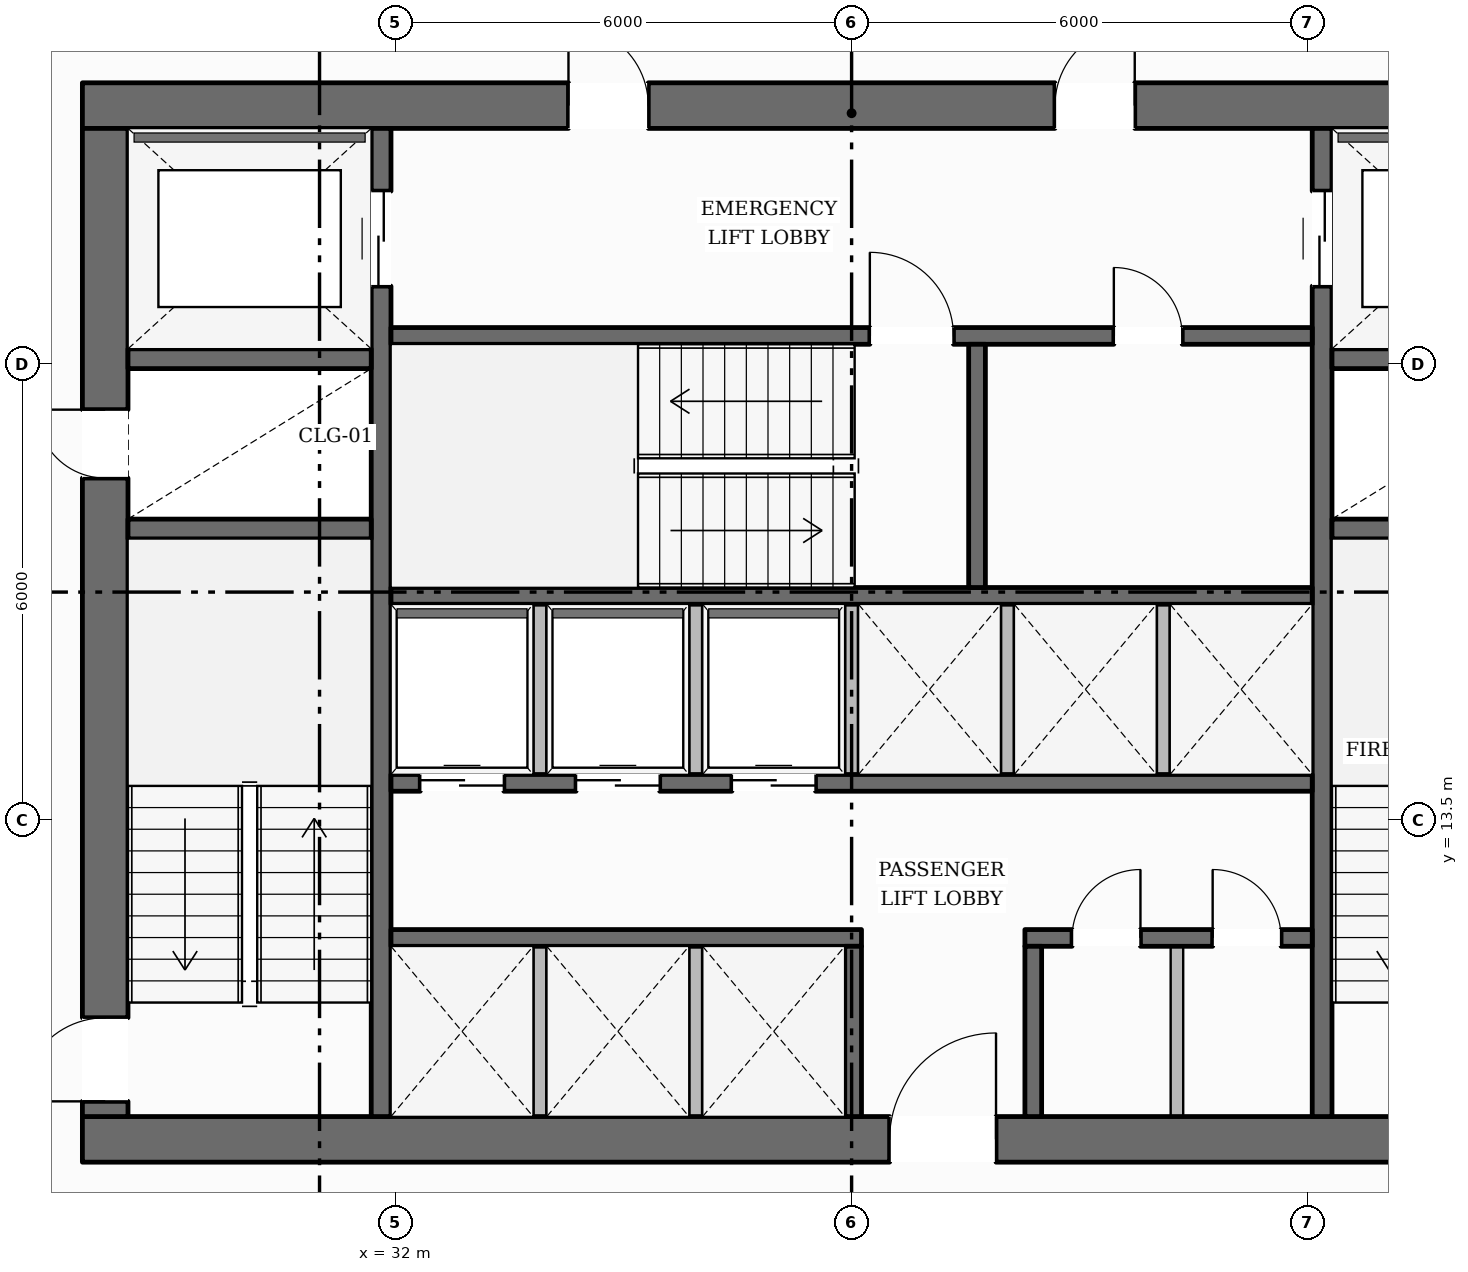
"""IFC4 building model, lengths in metres.
Left out: names, types, materials, properties, quantities, classifications, styles, units other than length and angle.
Written with IfcOpenShell. Run it as: python <this file> out.ifc"""

import sys

from ifc_helpers import new_model, si_unit, direction, frame, frame_2d, origin, place, context, subcontext, project, spatial, rectangle, extrude, element, fill, save


model = new_model("IFC4")
c1 = context("Model", 3, precision=1e-05, world=origin(), true_north=direction((0.0, 1.0)))
c2 = subcontext(c1, "Body", "Model", "MODEL_VIEW")
j1 = project(units=[si_unit("LENGTHUNIT", "METRE"), si_unit("PLANEANGLEUNIT", "RADIAN")], contexts=[c1])
p1 = place(None, origin())
s1 = spatial("IfcSite", under=j1, at=p1, CompositionType="ELEMENT")
p2 = place(p1, origin())
s2 = spatial("IfcBuilding", under=s1, at=p2, CompositionType="ELEMENT")
p3 = place(p2, frame((0.0, 0.0, 21.4)))
s3 = spatial("IfcBuildingStorey", under=s2, at=p3, CompositionType="ELEMENT", Elevation=21.4)
p4 = place(p3, frame((27.88, 9.3, 0.0), z_axis=(0.0, 0.0, 1.0), x_axis=(1.0, 0.0, 0.0)))
e1 = element("IfcWall", 1, at=p4, inside=s3, PredefinedType="SOLIDWALL", context=c2, shape_type="SweptSolid", body=[
    extrude(rectangle(XDim=20.24, YDim=0.6, at=frame_2d((10.12, 0.0))), origin(), (0.0, 0.0, 1.0), 3.59),
])
p5 = place(p4, frame((10.62, 0.0, 0.0)))
e2 = element("IfcOpeningElement", 2, at=p5, cuts=e1, PredefinedType="OPENING", context=c2, shape_type="SweptSolid", body=[
    extrude(rectangle(XDim=1.4, YDim=2.2, at=frame_2d((0.7, 1.1))), frame((0.0, 0.31, 0.0), z_axis=(0.0, -1.0, 0.0), x_axis=(1.0, 0.0, 0.0)), (0.0, 0.0, 1.0), 0.62),
])
p6 = place(p3, frame((27.88, 22.9, 0.0), z_axis=(0.0, 0.0, 1.0), x_axis=(1.0, 0.0, 0.0)))
e3 = element("IfcWall", 3, at=p6, inside=s3, PredefinedType="SOLIDWALL", context=c2, shape_type="SweptSolid", body=[
    extrude(rectangle(XDim=20.24, YDim=0.6, at=frame_2d((10.12, 0.0))), origin(), (0.0, 0.0, 1.0), 3.59),
])
p7 = place(p6, frame((6.395, 0.0, 0.0)))
e4 = element("IfcOpeningElement", 4, at=p7, cuts=e3, PredefinedType="OPENING", context=c2, shape_type="SweptSolid", body=[
    extrude(rectangle(XDim=1.05, YDim=2.15, at=frame_2d((0.525, 1.075))), frame((0.0, 0.31, 0.0), z_axis=(0.0, -1.0, 0.0), x_axis=(1.0, 0.0, 0.0)), (0.0, 0.0, 1.0), 0.62),
])
p8 = place(p6, frame((12.795, 0.0, 0.0)))
e5 = element("IfcOpeningElement", 5, at=p8, cuts=e3, PredefinedType="OPENING", context=c2, shape_type="SweptSolid", body=[
    extrude(rectangle(XDim=1.05, YDim=2.15, at=frame_2d((0.525, 1.075))), frame((0.0, 0.31, 0.0), z_axis=(0.0, -1.0, 0.0), x_axis=(1.0, 0.0, 0.0)), (0.0, 0.0, 1.0), 0.62),
])
p9 = place(p3, frame((28.18, 9.6, 0.0), z_axis=(0.0, 0.0, 1.0), x_axis=(0.0, 1.0, 0.0)))
e6 = element("IfcWall", 6, at=p9, inside=s3, PredefinedType="SOLIDWALL", context=c2, shape_type="SweptSolid", body=[
    extrude(rectangle(XDim=13.0, YDim=0.6, at=frame_2d((6.5, 0.0))), origin(), (0.0, 0.0, 1.0), 3.59),
])
p10 = place(p9, frame((0.2, 0.0, 0.0)))
e7 = element("IfcOpeningElement", 7, at=p10, cuts=e6, PredefinedType="OPENING", context=c2, shape_type="SweptSolid", body=[
    extrude(rectangle(XDim=1.1, YDim=2.15, at=frame_2d((0.55, 1.075))), frame((0.0, 0.31, 0.0), z_axis=(0.0, -1.0, 0.0), x_axis=(1.0, 0.0, 0.0)), (0.0, 0.0, 1.0), 0.62),
])
p11 = place(p9, frame((8.4, 0.0, 0.0)))
e8 = element("IfcOpeningElement", 8, at=p11, cuts=e6, PredefinedType="OPENING", context=c2, shape_type="SweptSolid", body=[
    extrude(rectangle(XDim=0.9, YDim=2.1, at=frame_2d((0.45, 1.05))), frame((0.0, 0.31, 0.0), z_axis=(0.0, -1.0, 0.0), x_axis=(1.0, 0.0, 0.0)), (0.0, 0.0, 1.0), 0.62),
])
p12 = place(p3, frame((31.81, 9.6, 0.0), z_axis=(0.0, 0.0, 1.0), x_axis=(0.0, 1.0, 0.0)))
e9 = element("IfcWall", 9, at=p12, inside=s3, PredefinedType="SHEAR", context=c2, shape_type="SweptSolid", body=[
    extrude(rectangle(XDim=13.0, YDim=0.26, at=frame_2d((6.5, 0.0))), origin(), (0.0, 0.0, 1.0), 3.59),
])
p13 = place(p12, frame((10.925, 0.0, 0.0)))
e10 = element("IfcOpeningElement", 10, at=p13, cuts=e9, PredefinedType="OPENING", context=c2, shape_type="SweptSolid", body=[
    extrude(rectangle(XDim=1.25, YDim=2.25, at=frame_2d((0.625, 1.125))), frame((0.0, 0.14, 0.0), z_axis=(0.0, -1.0, 0.0), x_axis=(1.0, 0.0, 0.0)), (0.0, 0.0, 1.0), 0.28),
])
p14 = place(p3, frame((44.19, 9.6, 0.0), z_axis=(0.0, 0.0, 1.0), x_axis=(0.0, 1.0, 0.0)))
e11 = element("IfcWall", 11, at=p14, inside=s3, PredefinedType="SHEAR", context=c2, shape_type="SweptSolid", body=[
    extrude(rectangle(XDim=13.0, YDim=0.26, at=frame_2d((6.5, 0.0))), origin(), (0.0, 0.0, 1.0), 3.59),
])
p15 = place(p14, frame((10.925, 0.0, 0.0)))
e12 = element("IfcOpeningElement", 12, at=p15, cuts=e11, PredefinedType="OPENING", context=c2, shape_type="SweptSolid", body=[
    extrude(rectangle(XDim=1.25, YDim=2.25, at=frame_2d((0.625, 1.125))), frame((0.0, 0.14, 0.0), z_axis=(0.0, -1.0, 0.0), x_axis=(1.0, 0.0, 0.0)), (0.0, 0.0, 1.0), 0.28),
])
for number, where, z_axis, x_axis in (
    (13, (28.48, 17.33, 0.0), (0.0, 0.0, 1.0), (1.0, 0.0, 0.0)),
    (14, (28.48, 19.57, 0.0), (0.0, 0.0, 1.0), (1.0, 0.0, 0.0)),
    (15, (44.32, 17.33, 0.0), (0.0, 0.0, 1.0), (1.0, 0.0, 0.0)),
    (16, (44.32, 19.57, 0.0), (0.0, 0.0, 1.0), (1.0, 0.0, 0.0)),
):
    element("IfcWall", number, at=place(p3, frame(where, z_axis=z_axis, x_axis=x_axis)), inside=s3, PredefinedType="SHEAR", context=c2, shape_type="SweptSolid", body=[
        extrude(rectangle(XDim=3.2, YDim=0.26, at=frame_2d((1.6, 0.0))), origin(), (0.0, 0.0, 1.0), 3.59),
    ])
p16 = place(p3, frame((31.94, 19.87, 0.0), z_axis=(0.0, 0.0, 1.0), x_axis=(1.0, 0.0, 0.0)))
e17 = element("IfcWall", 17, at=p16, inside=s3, PredefinedType="SOLIDWALL", context=c2, shape_type="SweptSolid", body=[
    extrude(rectangle(XDim=12.12, YDim=0.22, at=frame_2d((6.06, 0.0))), origin(), (0.0, 0.0, 1.0), 3.59),
])
p17 = place(p16, frame((6.3, 0.0, 0.0)))
e18 = element("IfcOpeningElement", 18, at=p17, cuts=e17, PredefinedType="OPENING", context=c2, shape_type="SweptSolid", body=[
    extrude(rectangle(XDim=1.1, YDim=2.15, at=frame_2d((0.55, 1.075))), frame((0.0, 0.12, 0.0), z_axis=(0.0, -1.0, 0.0), x_axis=(1.0, 0.0, 0.0)), (0.0, 0.0, 1.0), 0.24),
])
p18 = place(p16, frame((9.51, 0.0, 0.0)))
e19 = element("IfcOpeningElement", 19, at=p18, cuts=e17, PredefinedType="OPENING", context=c2, shape_type="SweptSolid", body=[
    extrude(rectangle(XDim=0.9, YDim=2.1, at=frame_2d((0.45, 1.05))), frame((0.0, 0.12, 0.0), z_axis=(0.0, -1.0, 0.0), x_axis=(1.0, 0.0, 0.0)), (0.0, 0.0, 1.0), 0.24),
])
p19 = place(p3, frame((31.94, 16.45, 0.0), z_axis=(0.0, 0.0, 1.0), x_axis=(1.0, 0.0, 0.0)))
e20 = element("IfcWall", 20, at=p19, inside=s3, PredefinedType="SOLIDWALL", context=c2, shape_type="SweptSolid", body=[
    extrude(rectangle(XDim=12.12, YDim=0.22, at=frame_2d((6.06, 0.0))), origin(), (0.0, 0.0, 1.0), 3.59),
])
p20 = place(p3, frame((39.65, 16.56, 0.0), z_axis=(0.0, 0.0, 1.0), x_axis=(0.0, 1.0, 0.0)))
e21 = element("IfcWall", 21, at=p20, inside=s3, PredefinedType="SOLIDWALL", context=c2, shape_type="SweptSolid", body=[
    extrude(rectangle(XDim=3.2, YDim=0.22, at=frame_2d((1.6, 0.0))), origin(), (0.0, 0.0, 1.0), 3.59),
])
p21 = place(p3, frame((31.94, 13.99, 0.0), z_axis=(0.0, 0.0, 1.0), x_axis=(1.0, 0.0, 0.0)))
e22 = element("IfcWall", 22, at=p21, inside=s3, PredefinedType="SOLIDWALL", context=c2, shape_type="SweptSolid", body=[
    extrude(rectangle(XDim=12.12, YDim=0.22, at=frame_2d((6.06, 0.0))), origin(), (0.0, 0.0, 1.0), 3.59),
])
p22 = place(p21, frame((0.385, 0.0, 0.0)))
e23 = element("IfcOpeningElement", 23, at=p22, cuts=e22, PredefinedType="OPENING", context=c2, shape_type="SweptSolid", body=[
    extrude(rectangle(XDim=1.1, YDim=2.2, at=frame_2d((0.55, 1.1))), frame((0.0, 0.12, 0.0), z_axis=(0.0, -1.0, 0.0), x_axis=(1.0, 0.0, 0.0)), (0.0, 0.0, 1.0), 0.24),
])
p23 = place(p21, frame((2.435, 0.0, 0.0)))
e24 = element("IfcOpeningElement", 24, at=p23, cuts=e22, PredefinedType="OPENING", context=c2, shape_type="SweptSolid", body=[
    extrude(rectangle(XDim=1.1, YDim=2.2, at=frame_2d((0.55, 1.1))), frame((0.0, 0.12, 0.0), z_axis=(0.0, -1.0, 0.0), x_axis=(1.0, 0.0, 0.0)), (0.0, 0.0, 1.0), 0.24),
])
p24 = place(p21, frame((4.485, 0.0, 0.0)))
e25 = element("IfcOpeningElement", 25, at=p24, cuts=e22, PredefinedType="OPENING", context=c2, shape_type="SweptSolid", body=[
    extrude(rectangle(XDim=1.1, YDim=2.2, at=frame_2d((0.55, 1.1))), frame((0.0, 0.12, 0.0), z_axis=(0.0, -1.0, 0.0), x_axis=(1.0, 0.0, 0.0)), (0.0, 0.0, 1.0), 0.24),
])
p25 = place(p3, frame((31.94, 11.95, 0.0), z_axis=(0.0, 0.0, 1.0), x_axis=(1.0, 0.0, 0.0)))
e26 = element("IfcWall", 26, at=p25, inside=s3, PredefinedType="SOLIDWALL", context=c2, shape_type="SweptSolid", body=[
    extrude(rectangle(XDim=6.19, YDim=0.22, at=frame_2d((3.095, 0.0))), origin(), (0.0, 0.0, 1.0), 3.59),
])
p26 = place(p3, frame((40.28, 11.95, 0.0), z_axis=(0.0, 0.0, 1.0), x_axis=(1.0, 0.0, 0.0)))
e27 = element("IfcWall", 27, at=p26, inside=s3, PredefinedType="SOLIDWALL", context=c2, shape_type="SweptSolid", body=[
    extrude(rectangle(XDim=3.78, YDim=0.22, at=frame_2d((1.89, 0.0))), origin(), (0.0, 0.0, 1.0), 3.59),
])
p27 = place(p26, frame((0.62, 0.0, 0.0)))
e28 = element("IfcOpeningElement", 28, at=p27, cuts=e27, PredefinedType="OPENING", context=c2, shape_type="SweptSolid", body=[
    extrude(rectangle(XDim=0.9, YDim=2.1, at=frame_2d((0.45, 1.05))), frame((0.0, 0.12, 0.0), z_axis=(0.0, -1.0, 0.0), x_axis=(1.0, 0.0, 0.0)), (0.0, 0.0, 1.0), 0.24),
])
p28 = place(p26, frame((2.47, 0.0, 0.0)))
e29 = element("IfcOpeningElement", 29, at=p28, cuts=e27, PredefinedType="OPENING", context=c2, shape_type="SweptSolid", body=[
    extrude(rectangle(XDim=0.9, YDim=2.1, at=frame_2d((0.45, 1.05))), frame((0.0, 0.12, 0.0), z_axis=(0.0, -1.0, 0.0), x_axis=(1.0, 0.0, 0.0)), (0.0, 0.0, 1.0), 0.24),
])
for number, where, z_axis, x_axis in (
    (30, (38.02, 9.6, 0.0), (0.0, 0.0, 1.0), (0.0, 1.0, 0.0)),
    (31, (40.39, 9.6, 0.0), (0.0, 0.0, 1.0), (0.0, 1.0, 0.0)),
):
    element("IfcWall", number, at=place(p3, frame(where, z_axis=z_axis, x_axis=x_axis)), inside=s3, PredefinedType="SOLIDWALL", context=c2, shape_type="SweptSolid", body=[
        extrude(rectangle(XDim=2.24, YDim=0.22, at=frame_2d((1.12, 0.0))), origin(), (0.0, 0.0, 1.0), 3.59),
    ])
p29 = place(p3, frame((13.263, 14.928, 0.0), z_axis=(0.0, 0.0, 1.0), x_axis=(0.495711630902, 0.868487178367, 0.0)))
e32 = element("IfcWall", 32, at=p29, inside=s3, PredefinedType="STANDARD", context=c2, shape_type="SweptSolid", body=[
    extrude(rectangle(XDim=34.092, YDim=0.38, at=frame_2d((17.046, 0.0))), origin(), (0.0, 0.0, 1.0), 2.97),
])
p30 = place(p29, frame((30.027, 0.0, 0.65)))
e33 = element("IfcOpeningElement", 33, at=p30, cuts=e32, PredefinedType="OPENING", context=c2, shape_type="SweptSolid", body=[
    extrude(rectangle(XDim=1.65, YDim=1.75, at=frame_2d((0.825, 0.875))), frame((0.0, 0.2, 0.0), z_axis=(0.0, -1.0, 0.0), x_axis=(1.0, 0.0, 0.0)), (0.0, 0.0, 1.0), 0.4),
])
p31 = place(p29, frame((24.504, 0.0, 0.65)))
e34 = element("IfcOpeningElement", 34, at=p31, cuts=e32, PredefinedType="OPENING", context=c2, shape_type="SweptSolid", body=[
    extrude(rectangle(XDim=1.65, YDim=1.75, at=frame_2d((0.825, 0.875))), frame((0.0, 0.2, 0.0), z_axis=(0.0, -1.0, 0.0), x_axis=(1.0, 0.0, 0.0)), (0.0, 0.0, 1.0), 0.4),
])
p32 = place(p29, frame((13.457, 0.0, 0.65)))
e35 = element("IfcOpeningElement", 35, at=p32, cuts=e32, PredefinedType="OPENING", context=c2, shape_type="SweptSolid", body=[
    extrude(rectangle(XDim=1.65, YDim=1.75, at=frame_2d((0.825, 0.875))), frame((0.0, 0.2, 0.0), z_axis=(0.0, -1.0, 0.0), x_axis=(1.0, 0.0, 0.0)), (0.0, 0.0, 1.0), 0.4),
])
p33 = place(p29, frame((7.934, 0.0, 0.65)))
e36 = element("IfcOpeningElement", 36, at=p33, cuts=e32, PredefinedType="OPENING", context=c2, shape_type="SweptSolid", body=[
    extrude(rectangle(XDim=1.65, YDim=1.75, at=frame_2d((0.825, 0.875))), frame((0.0, 0.2, 0.0), z_axis=(0.0, -1.0, 0.0), x_axis=(1.0, 0.0, 0.0)), (0.0, 0.0, 1.0), 0.4),
])
p34 = place(p29, frame((2.411, 0.0, 0.65)))
e37 = element("IfcOpeningElement", 37, at=p34, cuts=e32, PredefinedType="OPENING", context=c2, shape_type="SweptSolid", body=[
    extrude(rectangle(XDim=1.65, YDim=1.75, at=frame_2d((0.825, 0.875))), frame((0.0, 0.2, 0.0), z_axis=(0.0, -1.0, 0.0), x_axis=(1.0, 0.0, 0.0)), (0.0, 0.0, 1.0), 0.4),
])
for number, where, z_axis, x_axis in (
    (38, (33.9, 9.6, 0.0), (0.0, 0.0, 1.0), (0.0, 1.0, 0.0)),
    (39, (35.95, 9.6, 0.0), (0.0, 0.0, 1.0), (0.0, 1.0, 0.0)),
    (40, (33.9, 14.1, 0.0), (0.0, 0.0, 1.0), (0.0, 1.0, 0.0)),
    (41, (35.95, 14.1, 0.0), (0.0, 0.0, 1.0), (0.0, 1.0, 0.0)),
    (42, (38.0, 14.1, 0.0), (0.0, 0.0, 1.0), (0.0, 1.0, 0.0)),
    (43, (40.05, 14.1, 0.0), (0.0, 0.0, 1.0), (0.0, 1.0, 0.0)),
    (44, (42.1, 14.1, 0.0), (0.0, 0.0, 1.0), (0.0, 1.0, 0.0)),
    (45, (42.28, 9.6, 0.0), (0.0, 0.0, 1.0), (0.0, 1.0, 0.0)),
):
    element("IfcWall", number, at=place(p3, frame(where, z_axis=z_axis, x_axis=x_axis)), inside=s3, PredefinedType="PARTITIONING", context=c2, shape_type="SweptSolid", body=[
        extrude(rectangle(XDim=2.24, YDim=0.165, at=frame_2d((1.12, 0.0))), origin(), (0.0, 0.0, 1.0), 3.59),
    ])
p35 = place(p10, origin())
e46 = element("IfcDoor", 46, at=p35, inside=s3, OperationType="SINGLE_SWING_LEFT", PredefinedType="DOOR", context=c2, shape_type="SweptSolid", body=[
    extrude(rectangle(XDim=1.1, YDim=2.15, at=frame_2d((0.55, 1.075))), frame((0.0, 0.025, 0.0), z_axis=(0.0, -1.0, 0.0), x_axis=(1.0, 0.0, 0.0)), (0.0, 0.0, 1.0), 0.05),
])
fill(e7, e46)
p36 = place(p17, origin())
e47 = element("IfcDoor", 47, at=p36, inside=s3, OperationType="SINGLE_SWING_LEFT", PredefinedType="DOOR", context=c2, shape_type="SweptSolid", body=[
    extrude(rectangle(XDim=1.1, YDim=2.15, at=frame_2d((0.55, 1.075))), frame((0.0, 0.025, 0.0), z_axis=(0.0, -1.0, 0.0), x_axis=(1.0, 0.0, 0.0)), (0.0, 0.0, 1.0), 0.05),
])
fill(e18, e47)
p37 = place(p11, origin())
e48 = element("IfcDoor", 48, at=p37, inside=s3, OperationType="SINGLE_SWING_RIGHT", PredefinedType="DOOR", context=c2, shape_type="SweptSolid", body=[
    extrude(rectangle(XDim=0.9, YDim=2.1, at=frame_2d((0.45, 1.05))), frame((0.0, 0.025, 0.0), z_axis=(0.0, -1.0, 0.0), x_axis=(1.0, 0.0, 0.0)), (0.0, 0.0, 1.0), 0.05),
])
fill(e8, e48)
p38 = place(p7, origin())
e49 = element("IfcDoor", 49, at=p38, inside=s3, OperationType="SINGLE_SWING_LEFT", PredefinedType="DOOR", context=c2, shape_type="SweptSolid", body=[
    extrude(rectangle(XDim=1.05, YDim=2.15, at=frame_2d((0.525, 1.075))), frame((0.0, 0.025, 0.0), z_axis=(0.0, -1.0, 0.0), x_axis=(1.0, 0.0, 0.0)), (0.0, 0.0, 1.0), 0.05),
])
fill(e4, e49)
p39 = place(p8, origin())
e50 = element("IfcDoor", 50, at=p39, inside=s3, OperationType="SINGLE_SWING_RIGHT", PredefinedType="DOOR", context=c2, shape_type="SweptSolid", body=[
    extrude(rectangle(XDim=1.05, YDim=2.15, at=frame_2d((0.525, 1.075))), frame((0.0, 0.025, 0.0), z_axis=(0.0, -1.0, 0.0), x_axis=(1.0, 0.0, 0.0)), (0.0, 0.0, 1.0), 0.05),
])
fill(e5, e50)
p40 = place(p13, origin())
e51 = element("IfcDoor", 51, at=p40, inside=s3, OperationType="DOUBLE_DOOR_SLIDING", PredefinedType="DOOR", context=c2, shape_type="SweptSolid", body=[
    extrude(rectangle(XDim=1.25, YDim=2.25, at=frame_2d((0.625, 1.125))), frame((0.0, 0.025, 0.0), z_axis=(0.0, -1.0, 0.0), x_axis=(1.0, 0.0, 0.0)), (0.0, 0.0, 1.0), 0.05),
])
fill(e10, e51)
p41 = place(p15, origin())
e52 = element("IfcDoor", 52, at=p41, inside=s3, OperationType="DOUBLE_DOOR_SLIDING", PredefinedType="DOOR", context=c2, shape_type="SweptSolid", body=[
    extrude(rectangle(XDim=1.25, YDim=2.25, at=frame_2d((0.625, 1.125))), frame((0.0, 0.025, 0.0), z_axis=(0.0, -1.0, 0.0), x_axis=(1.0, 0.0, 0.0)), (0.0, 0.0, 1.0), 0.05),
])
fill(e12, e52)
p42 = place(p5, origin())
e53 = element("IfcDoor", 53, at=p42, inside=s3, OperationType="SINGLE_SWING_RIGHT", PredefinedType="DOOR", context=c2, shape_type="SweptSolid", body=[
    extrude(rectangle(XDim=1.4, YDim=2.2, at=frame_2d((0.7, 1.1))), frame((0.0, 0.025, 0.0), z_axis=(0.0, -1.0, 0.0), x_axis=(1.0, 0.0, 0.0)), (0.0, 0.0, 1.0), 0.05),
])
fill(e2, e53)
p43 = place(p22, origin())
e54 = element("IfcDoor", 54, at=p43, inside=s3, OperationType="DOUBLE_DOOR_SLIDING", PredefinedType="DOOR", context=c2, shape_type="SweptSolid", body=[
    extrude(rectangle(XDim=1.1, YDim=2.2, at=frame_2d((0.55, 1.1))), frame((0.0, 0.025, 0.0), z_axis=(0.0, -1.0, 0.0), x_axis=(1.0, 0.0, 0.0)), (0.0, 0.0, 1.0), 0.05),
])
fill(e23, e54)
p44 = place(p23, origin())
e55 = element("IfcDoor", 55, at=p44, inside=s3, OperationType="DOUBLE_DOOR_SLIDING", PredefinedType="DOOR", context=c2, shape_type="SweptSolid", body=[
    extrude(rectangle(XDim=1.1, YDim=2.2, at=frame_2d((0.55, 1.1))), frame((0.0, 0.025, 0.0), z_axis=(0.0, -1.0, 0.0), x_axis=(1.0, 0.0, 0.0)), (0.0, 0.0, 1.0), 0.05),
])
fill(e24, e55)
p45 = place(p24, origin())
e56 = element("IfcDoor", 56, at=p45, inside=s3, OperationType="DOUBLE_DOOR_SLIDING", PredefinedType="DOOR", context=c2, shape_type="SweptSolid", body=[
    extrude(rectangle(XDim=1.1, YDim=2.2, at=frame_2d((0.55, 1.1))), frame((0.0, 0.025, 0.0), z_axis=(0.0, -1.0, 0.0), x_axis=(1.0, 0.0, 0.0)), (0.0, 0.0, 1.0), 0.05),
])
fill(e25, e56)
p46 = place(p18, origin())
e57 = element("IfcDoor", 57, at=p46, inside=s3, OperationType="SINGLE_SWING_LEFT", PredefinedType="DOOR", context=c2, shape_type="SweptSolid", body=[
    extrude(rectangle(XDim=0.9, YDim=2.1, at=frame_2d((0.45, 1.05))), frame((0.0, 0.025, 0.0), z_axis=(0.0, -1.0, 0.0), x_axis=(1.0, 0.0, 0.0)), (0.0, 0.0, 1.0), 0.05),
])
fill(e19, e57)
p47 = place(p27, origin())
e58 = element("IfcDoor", 58, at=p47, inside=s3, OperationType="SINGLE_SWING_RIGHT", PredefinedType="DOOR", context=c2, shape_type="SweptSolid", body=[
    extrude(rectangle(XDim=0.9, YDim=2.1, at=frame_2d((0.45, 1.05))), frame((0.0, 0.025, 0.0), z_axis=(0.0, -1.0, 0.0), x_axis=(1.0, 0.0, 0.0)), (0.0, 0.0, 1.0), 0.05),
])
fill(e28, e58)
p48 = place(p28, origin())
e59 = element("IfcDoor", 59, at=p48, inside=s3, OperationType="SINGLE_SWING_LEFT", PredefinedType="DOOR", context=c2, shape_type="SweptSolid", body=[
    extrude(rectangle(XDim=0.9, YDim=2.1, at=frame_2d((0.45, 1.05))), frame((0.0, 0.025, 0.0), z_axis=(0.0, -1.0, 0.0), x_axis=(1.0, 0.0, 0.0)), (0.0, 0.0, 1.0), 0.05),
])
fill(e29, e59)
save(model, sys.argv[1])
